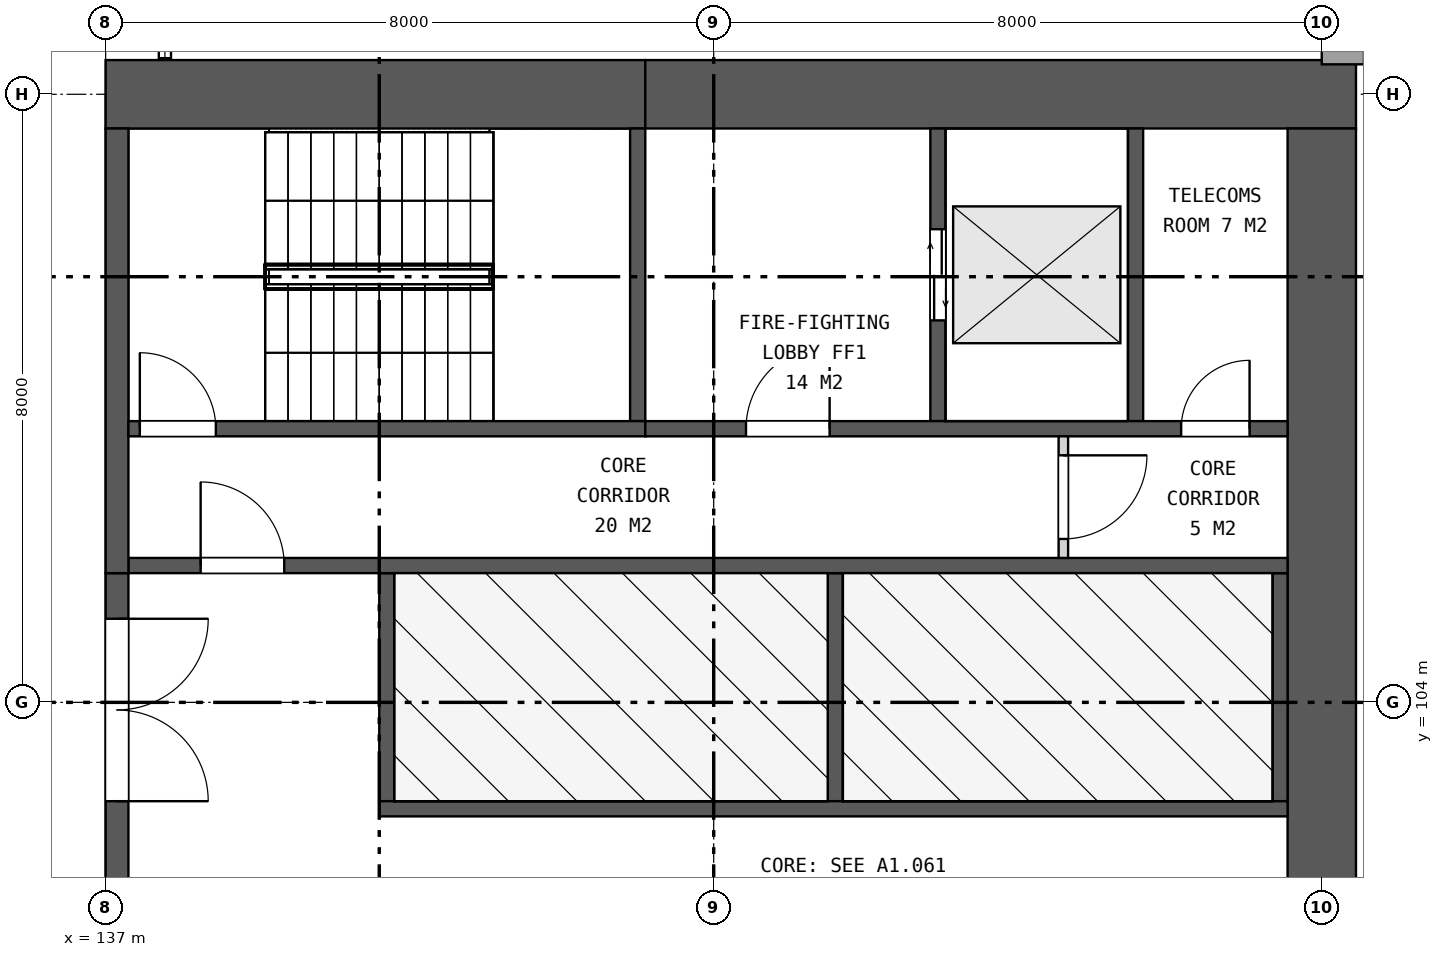
"""IFC4 building model, lengths in metres.
Left out: names, types, materials, properties, quantities, classifications, styles, units other than length and angle.
Written with IfcOpenShell. Run it as: python <this file> out.ifc"""

import sys

from ifc_helpers import new_model, si_unit, direction, frame, frame_2d, origin, place, context, subcontext, project, spatial, rectangle, extrude, element, fill, save


model = new_model("IFC4")
c1 = context("Model", 3, precision=1e-05, world=origin(), true_north=direction((0.0, 1.0)))
c2 = subcontext(c1, "Body", "Model", "MODEL_VIEW")
j1 = project(units=[si_unit("LENGTHUNIT", "METRE"), si_unit("PLANEANGLEUNIT", "RADIAN")], contexts=[c1])
p1 = place(None, origin())
s1 = spatial("IfcSite", under=j1, at=p1, CompositionType="ELEMENT")
p2 = place(p1, origin())
s2 = spatial("IfcBuilding", under=s1, at=p2, CompositionType="ELEMENT")
p3 = place(p2, frame((0.0, 0.0, 25.0)))
s3 = spatial("IfcBuildingStorey", under=s2, at=p3, CompositionType="ELEMENT", Elevation=25.0)
p4 = place(p3, frame((137.0, 112.0, 0.0), z_axis=(0.0, 0.0, 1.0), x_axis=(1.0, 0.0, 0.0)))
e1 = element("IfcWall", 1, at=p4, inside=s3, PredefinedType="SHEAR", context=c2, shape_type="SweptSolid", body=[
    extrude(rectangle(XDim=7.1, YDim=0.9, at=frame_2d((3.55, 0.0))), origin(), (0.0, 0.0, 1.0), 9.0),
])
p5 = place(p3, frame((144.1, 112.0, 0.0), z_axis=(0.0, 0.0, 1.0), x_axis=(1.0, 0.0, 0.0)))
e2 = element("IfcWall", 2, at=p5, inside=s3, PredefinedType="SHEAR", context=c2, shape_type="SweptSolid", body=[
    extrude(rectangle(XDim=9.35, YDim=0.9, at=frame_2d((4.675, 0.0))), origin(), (0.0, 0.0, 1.0), 9.0),
])
p6 = place(p3, frame((153.0, 88.45, 0.0), z_axis=(0.0, 0.0, 1.0), x_axis=(0.0, 1.0, 0.0)))
e3 = element("IfcWall", 3, at=p6, inside=s3, PredefinedType="SHEAR", context=c2, shape_type="SweptSolid", body=[
    extrude(rectangle(XDim=23.1, YDim=0.9, at=frame_2d((11.55, 0.0))), origin(), (0.0, 0.0, 1.0), 9.0),
])
p7 = place(p6, frame((10.35, 0.0, 0.0)))
e4 = element("IfcOpeningElement", 4, at=p7, cuts=e3, PredefinedType="OPENING", context=c2, shape_type="SweptSolid", body=[
    extrude(rectangle(XDim=2.4, YDim=2.4, at=frame_2d((1.2, 1.2))), frame((0.0, 0.46, 0.0), z_axis=(0.0, -1.0, 0.0), x_axis=(1.0, 0.0, 0.0)), (0.0, 0.0, 1.0), 0.92),
])
p8 = place(p3, frame((137.15, 94.3, 0.0), z_axis=(0.0, 0.0, 1.0), x_axis=(0.0, 1.0, 0.0)))
e5 = element("IfcWall", 5, at=p8, inside=s3, PredefinedType="SHEAR", context=c2, shape_type="SweptSolid", body=[
    extrude(rectangle(XDim=11.4, YDim=0.3, at=frame_2d((5.7, 0.0))), origin(), (0.0, 0.0, 1.0), 9.0),
])
p9 = place(p8, frame((0.6, 0.0, 0.0)))
e6 = element("IfcOpeningElement", 6, at=p9, cuts=e5, PredefinedType="OPENING", context=c2, shape_type="SweptSolid", body=[
    extrude(rectangle(XDim=2.4, YDim=2.4, at=frame_2d((1.2, 1.2))), frame((0.0, 0.16, 0.0), z_axis=(0.0, -1.0, 0.0), x_axis=(1.0, 0.0, 0.0)), (0.0, 0.0, 1.0), 0.32),
])
p10 = place(p8, frame((4.5, 0.0, 0.0)))
e7 = element("IfcOpeningElement", 7, at=p10, cuts=e5, PredefinedType="OPENING", context=c2, shape_type="SweptSolid", body=[
    extrude(rectangle(XDim=2.4, YDim=2.4, at=frame_2d((1.2, 1.2))), frame((0.0, 0.16, 0.0), z_axis=(0.0, -1.0, 0.0), x_axis=(1.0, 0.0, 0.0)), (0.0, 0.0, 1.0), 0.32),
])
p11 = place(p8, frame((8.4, 0.0, 0.0)))
e8 = element("IfcOpeningElement", 8, at=p11, cuts=e5, PredefinedType="OPENING", context=c2, shape_type="SweptSolid", body=[
    extrude(rectangle(XDim=2.4, YDim=2.4, at=frame_2d((1.2, 1.2))), frame((0.0, 0.16, 0.0), z_axis=(0.0, -1.0, 0.0), x_axis=(1.0, 0.0, 0.0)), (0.0, 0.0, 1.0), 0.32),
])
for number, where, z_axis, x_axis in (
    (9, (140.7, 102.7, 0.0), (0.0, 0.0, 1.0), (0.0, 1.0, 0.0)),
    (10, (146.6, 102.7, 0.0), (0.0, 0.0, 1.0), (0.0, 1.0, 0.0)),
    (11, (152.45, 102.7, 0.0), (0.0, 0.0, 1.0), (0.0, 1.0, 0.0)),
):
    element("IfcWall", number, at=place(p3, frame(where, z_axis=z_axis, x_axis=x_axis)), inside=s3, PredefinedType="SHEAR", context=c2, shape_type="SweptSolid", body=[
        extrude(rectangle(XDim=3.0, YDim=0.2, at=frame_2d((1.5, 0.0))), origin(), (0.0, 0.0, 1.0), 9.0),
    ])
p12 = place(p3, frame((140.6, 102.6, 0.0), z_axis=(0.0, 0.0, 1.0), x_axis=(1.0, 0.0, 0.0)))
e12 = element("IfcWall", 12, at=p12, inside=s3, PredefinedType="SHEAR", context=c2, shape_type="SweptSolid", body=[
    extrude(rectangle(XDim=11.95, YDim=0.2, at=frame_2d((5.975, 0.0))), origin(), (0.0, 0.0, 1.0), 9.0),
])
p13 = place(p3, frame((137.3, 105.8, 0.0), z_axis=(0.0, 0.0, 1.0), x_axis=(1.0, 0.0, 0.0)))
e13 = element("IfcWall", 13, at=p13, inside=s3, PredefinedType="SHEAR", context=c2, shape_type="SweptSolid", body=[
    extrude(rectangle(XDim=15.25, YDim=0.2, at=frame_2d((7.625, 0.0))), origin(), (0.0, 0.0, 1.0), 9.0),
])
p14 = place(p13, frame((0.95, 0.0, 0.0)))
e14 = element("IfcOpeningElement", 14, at=p14, cuts=e13, PredefinedType="OPENING", context=c2, shape_type="SweptSolid", body=[
    extrude(rectangle(XDim=1.1, YDim=2.1, at=frame_2d((0.55, 1.05))), frame((0.0, 0.11, 0.0), z_axis=(0.0, -1.0, 0.0), x_axis=(1.0, 0.0, 0.0)), (0.0, 0.0, 1.0), 0.22),
])
p15 = place(p3, frame((137.15, 105.7, 0.0), z_axis=(0.0, 0.0, 1.0), x_axis=(0.0, 1.0, 0.0)))
e15 = element("IfcWall", 15, at=p15, inside=s3, PredefinedType="SHEAR", context=c2, shape_type="SweptSolid", body=[
    extrude(rectangle(XDim=5.85, YDim=0.3, at=frame_2d((2.925, 0.0))), origin(), (0.0, 0.0, 1.0), 9.0),
])
p16 = place(p3, frame((144.0, 107.7, 0.0), z_axis=(0.0, 0.0, 1.0), x_axis=(0.0, 1.0, 0.0)))
e16 = element("IfcWall", 16, at=p16, inside=s3, PredefinedType="SHEAR", context=c2, shape_type="SweptSolid", body=[
    extrude(rectangle(XDim=3.85, YDim=0.2, at=frame_2d((1.925, 0.0))), origin(), (0.0, 0.0, 1.0), 9.0),
])
p17 = place(p3, frame((147.95, 107.7, 0.0), z_axis=(0.0, 0.0, 1.0), x_axis=(0.0, 1.0, 0.0)))
e17 = element("IfcWall", 17, at=p17, inside=s3, PredefinedType="SHEAR", context=c2, shape_type="SweptSolid", body=[
    extrude(rectangle(XDim=3.85, YDim=0.2, at=frame_2d((1.925, 0.0))), origin(), (0.0, 0.0, 1.0), 9.0),
])
p18 = place(p17, frame((1.325, 0.0, 0.0)))
e18 = element("IfcOpeningElement", 18, at=p18, cuts=e17, PredefinedType="OPENING", context=c2, shape_type="SweptSolid", body=[
    extrude(rectangle(XDim=1.2, YDim=2.1, at=frame_2d((0.6, 1.05))), frame((0.0, 0.11, 0.0), z_axis=(0.0, -1.0, 0.0), x_axis=(1.0, 0.0, 0.0)), (0.0, 0.0, 1.0), 0.22),
])
p19 = place(p3, frame((150.55, 107.7, 0.0), z_axis=(0.0, 0.0, 1.0), x_axis=(0.0, 1.0, 0.0)))
e19 = element("IfcWall", 19, at=p19, inside=s3, PredefinedType="SHEAR", context=c2, shape_type="SweptSolid", body=[
    extrude(rectangle(XDim=3.85, YDim=0.2, at=frame_2d((1.925, 0.0))), origin(), (0.0, 0.0, 1.0), 9.0),
])
p20 = place(p3, frame((137.3, 107.6, 0.0), z_axis=(0.0, 0.0, 1.0), x_axis=(1.0, 0.0, 0.0)))
e20 = element("IfcWall", 20, at=p20, inside=s3, PredefinedType="SHEAR", context=c2, shape_type="SweptSolid", body=[
    extrude(rectangle(XDim=6.8, YDim=0.2, at=frame_2d((3.4, 0.0))), origin(), (0.0, 0.0, 1.0), 9.0),
])
p21 = place(p20, frame((0.15, 0.0, 0.0)))
e21 = element("IfcOpeningElement", 21, at=p21, cuts=e20, PredefinedType="OPENING", context=c2, shape_type="SweptSolid", body=[
    extrude(rectangle(XDim=1.0, YDim=2.1, at=frame_2d((0.5, 1.05))), frame((0.0, 0.11, 0.0), z_axis=(0.0, -1.0, 0.0), x_axis=(1.0, 0.0, 0.0)), (0.0, 0.0, 1.0), 0.22),
])
p22 = place(p3, frame((144.1, 107.6, 0.0), z_axis=(0.0, 0.0, 1.0), x_axis=(1.0, 0.0, 0.0)))
e22 = element("IfcWall", 22, at=p22, inside=s3, PredefinedType="SHEAR", context=c2, shape_type="SweptSolid", body=[
    extrude(rectangle(XDim=8.45, YDim=0.2, at=frame_2d((4.225, 0.0))), origin(), (0.0, 0.0, 1.0), 9.0),
])
p23 = place(p22, frame((1.325, 0.0, 0.0)))
e23 = element("IfcOpeningElement", 23, at=p23, cuts=e22, PredefinedType="OPENING", context=c2, shape_type="SweptSolid", body=[
    extrude(rectangle(XDim=1.1, YDim=2.1, at=frame_2d((0.55, 1.05))), frame((0.0, 0.11, 0.0), z_axis=(0.0, -1.0, 0.0), x_axis=(1.0, 0.0, 0.0)), (0.0, 0.0, 1.0), 0.22),
])
p24 = place(p22, frame((7.05, 0.0, 0.0)))
e24 = element("IfcOpeningElement", 24, at=p24, cuts=e22, PredefinedType="OPENING", context=c2, shape_type="SweptSolid", body=[
    extrude(rectangle(XDim=0.9, YDim=2.1, at=frame_2d((0.45, 1.05))), frame((0.0, 0.11, 0.0), z_axis=(0.0, -1.0, 0.0), x_axis=(1.0, 0.0, 0.0)), (0.0, 0.0, 1.0), 0.22),
])
p25 = place(p3, frame((149.6, 105.9, 0.0), z_axis=(0.0, 0.0, 1.0), x_axis=(0.0, 1.0, 0.0)))
e25 = element("IfcWall", 25, at=p25, inside=s3, PredefinedType="PARTITIONING", context=c2, shape_type="SweptSolid", body=[
    extrude(rectangle(XDim=1.6, YDim=0.125, at=frame_2d((0.8, 0.0))), origin(), (0.0, 0.0, 1.0), 9.0),
])
p26 = place(p25, frame((0.25, 0.0, 0.0)))
e26 = element("IfcOpeningElement", 26, at=p26, cuts=e25, PredefinedType="OPENING", context=c2, shape_type="SweptSolid", body=[
    extrude(rectangle(XDim=1.1, YDim=2.1, at=frame_2d((0.55, 1.05))), frame((0.0, 0.073, 0.0), z_axis=(0.0, -1.0, 0.0), x_axis=(1.0, 0.0, 0.0)), (0.0, 0.0, 1.0), 0.145),
])
p27 = place(p3, frame((153.0, 112.547, 0.0), z_axis=(0.0, 0.0, 1.0), x_axis=(1.0, 0.0, 0.0)))
e27 = element("IfcWall", 27, at=p27, inside=s3, PredefinedType="SOLIDWALL", context=c2, shape_type="SweptSolid", body=[
    extrude(rectangle(XDim=0.555, YDim=0.306, at=frame_2d((0.277, 0.0))), origin(), (0.0, 0.0, 1.0), 8.6),
])
p28 = place(p11, frame((2.4, 0.0, 0.0), z_axis=(0.0, 0.0, 1.0), x_axis=(-1.0, 0.0, 0.0)))
e28 = element("IfcDoor", 28, at=p28, inside=s3, OperationType="DOUBLE_DOOR_SINGLE_SWING", PredefinedType="DOOR", context=c2, shape_type="SweptSolid", body=[
    extrude(rectangle(XDim=2.4, YDim=2.4, at=frame_2d((1.2, 1.2))), frame((0.0, 0.025, 0.0), z_axis=(0.0, -1.0, 0.0), x_axis=(1.0, 0.0, 0.0)), (0.0, 0.0, 1.0), 0.05),
])
fill(e8, e28)
p29 = place(p14, origin())
e29 = element("IfcDoor", 29, at=p29, inside=s3, OperationType="SINGLE_SWING_LEFT", PredefinedType="DOOR", context=c2, shape_type="SweptSolid", body=[
    extrude(rectangle(XDim=1.1, YDim=2.1, at=frame_2d((0.55, 1.05))), frame((0.0, 0.025, 0.0), z_axis=(0.0, -1.0, 0.0), x_axis=(1.0, 0.0, 0.0)), (0.0, 0.0, 1.0), 0.05),
])
fill(e14, e29)
p30 = place(p18, origin())
e30 = element("IfcDoor", 30, at=p30, inside=s3, OperationType="DOUBLE_DOOR_SLIDING", PredefinedType="DOOR", context=c2, shape_type="SweptSolid", body=[
    extrude(rectangle(XDim=1.2, YDim=2.1, at=frame_2d((0.6, 1.05))), frame((0.0, 0.025, 0.0), z_axis=(0.0, -1.0, 0.0), x_axis=(1.0, 0.0, 0.0)), (0.0, 0.0, 1.0), 0.05),
])
fill(e18, e30)
p31 = place(p21, origin())
e31 = element("IfcDoor", 31, at=p31, inside=s3, OperationType="SINGLE_SWING_LEFT", PredefinedType="DOOR", context=c2, shape_type="SweptSolid", body=[
    extrude(rectangle(XDim=1.0, YDim=2.1, at=frame_2d((0.5, 1.05))), frame((0.0, 0.025, 0.0), z_axis=(0.0, -1.0, 0.0), x_axis=(1.0, 0.0, 0.0)), (0.0, 0.0, 1.0), 0.05),
])
fill(e21, e31)
p32 = place(p23, origin())
e32 = element("IfcDoor", 32, at=p32, inside=s3, OperationType="SINGLE_SWING_RIGHT", PredefinedType="DOOR", context=c2, shape_type="SweptSolid", body=[
    extrude(rectangle(XDim=1.1, YDim=2.1, at=frame_2d((0.55, 1.05))), frame((0.0, 0.025, 0.0), z_axis=(0.0, -1.0, 0.0), x_axis=(1.0, 0.0, 0.0)), (0.0, 0.0, 1.0), 0.05),
])
fill(e23, e32)
p33 = place(p24, origin())
e33 = element("IfcDoor", 33, at=p33, inside=s3, OperationType="SINGLE_SWING_RIGHT", PredefinedType="DOOR", context=c2, shape_type="SweptSolid", body=[
    extrude(rectangle(XDim=0.9, YDim=2.1, at=frame_2d((0.45, 1.05))), frame((0.0, 0.025, 0.0), z_axis=(0.0, -1.0, 0.0), x_axis=(1.0, 0.0, 0.0)), (0.0, 0.0, 1.0), 0.05),
])
fill(e24, e33)
p34 = place(p26, frame((1.1, 0.0, 0.0), z_axis=(0.0, 0.0, 1.0), x_axis=(-1.0, 0.0, 0.0)))
e34 = element("IfcDoor", 34, at=p34, inside=s3, OperationType="SINGLE_SWING_LEFT", PredefinedType="DOOR", context=c2, shape_type="SweptSolid", body=[
    extrude(rectangle(XDim=1.1, YDim=2.1, at=frame_2d((0.55, 1.05))), frame((0.0, 0.025, 0.0), z_axis=(0.0, -1.0, 0.0), x_axis=(1.0, 0.0, 0.0)), (0.0, 0.0, 1.0), 0.05),
])
fill(e26, e34)
save(model, sys.argv[1])
